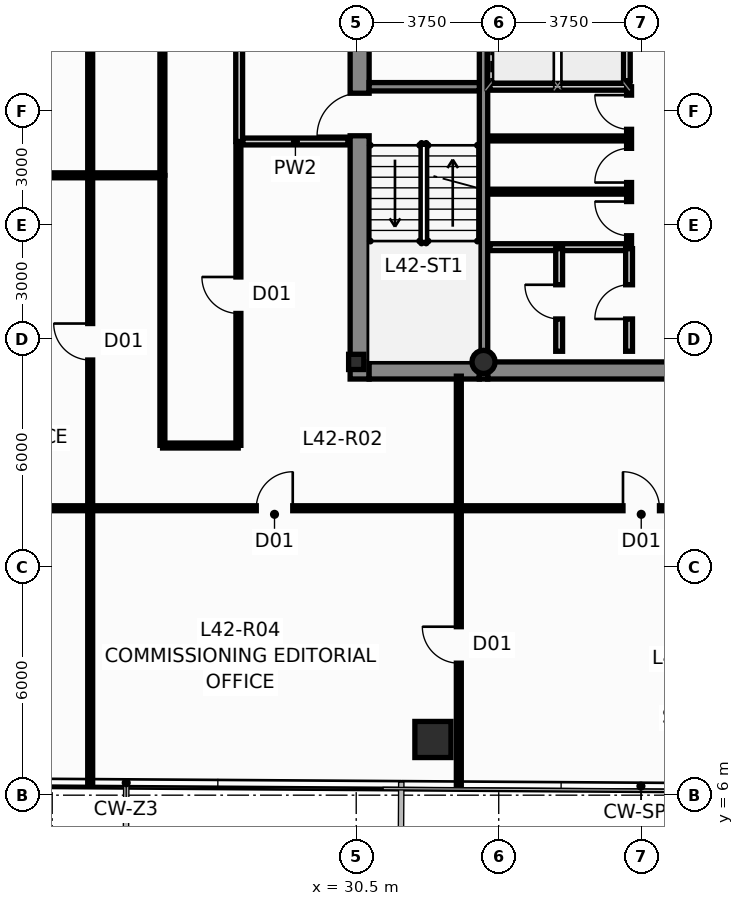
"""IFC4 building model, lengths in metres.
Left out: names, types, materials, properties, quantities, classifications, styles, units other than length and angle.
Written with IfcOpenShell. Run it as: python <this file> out.ifc"""

import sys

from ifc_helpers import new_model, si_unit, direction, frame, frame_2d, origin, origin_2d, place, context, subcontext, project, spatial, rectangle, hollow_rectangle, hollow_circle, i_section, extrude, source, transform, mapped, element, fill, save


model = new_model("IFC4")
c1 = context("Model", 3, precision=1e-05, world=origin(), true_north=direction((0.0, 1.0)))
c2 = subcontext(c1, "Body", "Model", "MODEL_VIEW")
j1 = project(units=[si_unit("LENGTHUNIT", "METRE"), si_unit("PLANEANGLEUNIT", "RADIAN")], contexts=[c1])
p1 = place(None, origin())
s1 = spatial("IfcSite", under=j1, at=p1, CompositionType="ELEMENT")
p2 = place(p1, origin())
s2 = spatial("IfcBuilding", under=s1, at=p2, CompositionType="ELEMENT")
p3 = place(p2, frame((0.0, 0.0, 162.15)))
s3 = spatial("IfcBuildingStorey", under=s2, at=p3, CompositionType="ELEMENT", Elevation=162.15)
m1 = source(origin(), c2, "Body", "SweptSolid", [
    extrude(i_section(OverallWidth=0.4, OverallDepth=0.4, WebThickness=0.02, FlangeThickness=0.032, at=origin_2d()), origin(), (0.0, 0.0, 1.0), 3.65),
])
p4 = place(p3, frame((30.5, 17.4, 0.0), z_axis=(0.0, 0.0, 1.0), x_axis=(1.0, 0.0, 0.0)))
e1 = element("IfcColumn", 1, at=p4, inside=s3, PredefinedType="COLUMN", context=c2, shape_type="MappedRepresentation", body=[
    mapped(m1, transform((0.0, 0.0, 0.0), scale=1.0)),
])
m2 = source(origin(), c2, "Body", "SweptSolid", [
    extrude(hollow_circle(Radius=0.305, WallThickness=0.025, at=origin_2d()), origin(), (0.0, 0.0, 1.0), 3.65),
])
p5 = place(p3, frame((33.85, 17.4, 0.0), z_axis=(0.0, 0.0, 1.0), x_axis=(1.0, 0.0, 0.0)))
e2 = element("IfcColumn", 2, at=p5, inside=s3, PredefinedType="COLUMN", context=c2, shape_type="MappedRepresentation", body=[
    mapped(m2, transform((0.0, 0.0, 0.0), scale=1.0)),
])
p6 = place(p3, frame((30.59, 16.95, 0.0), z_axis=(0.0, 0.0, 1.0), x_axis=(0.0, 1.0, 0.0)))
e3 = element("IfcWall", 3, at=p6, inside=s3, PredefinedType="SHEAR", context=c2, shape_type="SweptSolid", body=[
    extrude(rectangle(XDim=13.275, YDim=0.5, at=frame_2d((6.638, 0.0))), origin(), (0.0, 0.0, 1.0), 3.65),
])
p7 = place(p6, frame((6.4, 0.0, 0.0)))
e4 = element("IfcOpeningElement", 4, at=p7, cuts=e3, PredefinedType="OPENING", context=c2, shape_type="SweptSolid", body=[
    extrude(rectangle(XDim=1.12, YDim=2.15, at=frame_2d((0.56, 1.075))), frame((0.0, 0.262, 0.0), z_axis=(0.0, -1.0, 0.0), x_axis=(1.0, 0.0, 0.0)), (0.0, 0.0, 1.0), 0.524),
])
p8 = place(p6, frame((10.85, 0.0, 0.0)))
e5 = element("IfcOpeningElement", 5, at=p8, cuts=e3, PredefinedType="OPENING", context=c2, shape_type="SweptSolid", body=[
    extrude(rectangle(XDim=1.2, YDim=2.2, at=frame_2d((0.6, 1.1))), frame((0.0, 0.262, 0.0), z_axis=(0.0, -1.0, 0.0), x_axis=(1.0, 0.0, 0.0)), (0.0, 0.0, 1.0), 0.524),
])
p9 = place(p3, frame((30.84, 17.175, 0.0), z_axis=(0.0, 0.0, 1.0), x_axis=(1.0, 0.0, 0.0)))
e6 = element("IfcWall", 6, at=p9, inside=s3, PredefinedType="SHEAR", context=c2, shape_type="SweptSolid", body=[
    extrude(rectangle(XDim=2.9, YDim=0.45, at=frame_2d((1.45, 0.0))), origin(), (0.0, 0.0, 1.0), 3.65),
])
p10 = place(p3, frame((33.96, 17.175, 0.0), z_axis=(0.0, 0.0, 1.0), x_axis=(1.0, 0.0, 0.0)))
e7 = element("IfcWall", 7, at=p10, inside=s3, PredefinedType="SHEAR", context=c2, shape_type="SweptSolid", body=[
    extrude(rectangle(XDim=8.08, YDim=0.45, at=frame_2d((4.04, 0.0))), origin(), (0.0, 0.0, 1.0), 3.65),
])
p11 = place(p3, frame((33.85, 16.95, 0.0), z_axis=(0.0, 0.0, 1.0), x_axis=(0.0, 1.0, 0.0)))
e8 = element("IfcWall", 8, at=p11, inside=s3, PredefinedType="SHEAR", context=c2, shape_type="SweptSolid", body=[
    extrude(rectangle(XDim=13.275, YDim=0.22, at=frame_2d((6.638, 0.0))), origin(), (0.0, 0.0, 1.0), 3.65),
])
p12 = place(p3, frame((30.84, 24.64, 0.0), z_axis=(0.0, 0.0, 1.0), x_axis=(1.0, 0.0, 0.0)))
e9 = element("IfcWall", 9, at=p12, inside=s3, PredefinedType="SHEAR", context=c2, shape_type="SweptSolid", body=[
    extrude(rectangle(XDim=2.9, YDim=0.22, at=frame_2d((1.45, 0.0))), origin(), (0.0, 0.0, 1.0), 3.65),
])
m3 = source(origin(), c2, "Body", "SweptSolid", [
    extrude(hollow_rectangle(XDim=0.95, YDim=0.95, WallThickness=0.05, at=origin_2d()), origin(), (0.0, 0.0, 1.0), 3.651),
])
p13 = place(p3, frame((32.519, 7.465, 0.0), z_axis=(-0.004480382638, 0.019793929266, 0.999794042058), x_axis=(-0.975326687046, -0.220766513622, 0.0)))
e10 = element("IfcColumn", 10, at=p13, inside=s3, PredefinedType="COLUMN", context=c2, shape_type="MappedRepresentation", body=[
    mapped(m3, transform((0.0, 0.0, 0.0), scale=1.0)),
])
p14 = place(p3, frame((37.62, 24.8, 0.0), z_axis=(0.0, 0.0, 1.0), x_axis=(0.0, 1.0, 0.0)))
e11 = element("IfcWall", 11, at=p14, inside=s3, PredefinedType="PARTITIONING", context=c2, shape_type="SweptSolid", body=[
    extrude(rectangle(XDim=2.0, YDim=0.18, at=frame_2d((1.0, 0.0))), origin(), (0.0, 0.0, 1.0), 3.4),
])
p15 = place(p3, frame((34.02, 24.64, 0.0), z_axis=(0.0, 0.0, 1.0), x_axis=(1.0, 0.0, 0.0)))
e12 = element("IfcWall", 12, at=p15, inside=s3, PredefinedType="PARTITIONING", context=c2, shape_type="SweptSolid", body=[
    extrude(rectangle(XDim=3.68, YDim=0.18, at=frame_2d((1.84, 0.0))), origin(), (0.0, 0.0, 1.0), 3.4),
])
p16 = place(p3, frame((27.42, 23.2, 0.0), z_axis=(0.0, 0.0, 1.0), x_axis=(0.0, 1.0, 0.0)))
e13 = element("IfcWall", 13, at=p16, inside=s3, PredefinedType="PARTITIONING", context=c2, shape_type="SweptSolid", body=[
    extrude(rectangle(XDim=6.4, YDim=0.18, at=frame_2d((3.2, 0.0))), origin(), (0.0, 0.0, 1.0), 3.078),
])
p17 = place(p16, frame((2.65, 0.0, 0.0)))
e14 = element("IfcOpeningElement", 14, at=p17, cuts=e13, PredefinedType="OPENING", context=c2, shape_type="SweptSolid", body=[
    extrude(rectangle(XDim=1.05, YDim=2.15, at=frame_2d((0.525, 1.075))), frame((0.0, 0.102, 0.0), z_axis=(0.0, -1.0, 0.0), x_axis=(1.0, 0.0, 0.0)), (0.0, 0.0, 1.0), 0.204),
])
p18 = place(p3, frame((27.52, 23.2, 0.0), z_axis=(0.0, 0.0, 1.0), x_axis=(1.0, 0.0, 0.0)))
e15 = element("IfcWall", 15, at=p18, inside=s3, PredefinedType="PARTITIONING", context=c2, shape_type="SweptSolid", body=[
    extrude(rectangle(XDim=2.76, YDim=0.18, at=frame_2d((1.38, 0.0))), origin(), (0.0, 0.0, 1.0), 3.4),
])
p19 = place(p3, frame((34.02, 20.42, 0.0), z_axis=(0.0, 0.0, 1.0), x_axis=(1.0, 0.0, 0.0)))
e16 = element("IfcWall", 16, at=p19, inside=s3, PredefinedType="PARTITIONING", context=c2, shape_type="SweptSolid", body=[
    extrude(rectangle(XDim=3.64, YDim=0.18, at=frame_2d((1.82, 0.0))), origin(), (0.0, 0.0, 1.0), 3.4),
])
for number, where, z_axis, x_axis in (
    (17, (34.02, 21.88, 0.0), (0.0, 0.0, 1.0), (1.0, 0.0, 0.0)),
    (18, (34.02, 23.28, 0.0), (0.0, 0.0, 1.0), (1.0, 0.0, 0.0)),
):
    element("IfcWall", number, at=place(p3, frame(where, z_axis=z_axis, x_axis=x_axis)), inside=s3, PredefinedType="PARTITIONING", context=c2, shape_type="SweptSolid", body=[
        extrude(rectangle(XDim=3.58, YDim=0.13, at=frame_2d((1.79, 0.0))), origin(), (0.0, 0.0, 1.0), 3.4),
    ])
p20 = place(p3, frame((37.68, 20.5, 0.0), z_axis=(0.0, 0.0, 1.0), x_axis=(0.0, 1.0, 0.0)))
e19 = element("IfcWall", 19, at=p20, inside=s3, PredefinedType="PARTITIONING", context=c2, shape_type="SweptSolid", body=[
    extrude(rectangle(XDim=4.14, YDim=0.13, at=frame_2d((2.07, 0.0))), origin(), (0.0, 0.0, 1.0), 3.4),
])
p21 = place(p20, frame((0.22, 0.0, 0.0)))
e20 = element("IfcOpeningElement", 20, at=p21, cuts=e19, PredefinedType="OPENING", context=c2, shape_type="SweptSolid", body=[
    extrude(rectangle(XDim=0.9, YDim=2.1, at=frame_2d((0.45, 1.05))), frame((0.0, 0.077, 0.0), z_axis=(0.0, -1.0, 0.0), x_axis=(1.0, 0.0, 0.0)), (0.0, 0.0, 1.0), 0.154),
])
p22 = place(p20, frame((1.62, 0.0, 0.0)))
e21 = element("IfcOpeningElement", 21, at=p22, cuts=e19, PredefinedType="OPENING", context=c2, shape_type="SweptSolid", body=[
    extrude(rectangle(XDim=0.9, YDim=2.1, at=frame_2d((0.45, 1.05))), frame((0.0, 0.077, 0.0), z_axis=(0.0, -1.0, 0.0), x_axis=(1.0, 0.0, 0.0)), (0.0, 0.0, 1.0), 0.154),
])
p23 = place(p20, frame((3.02, 0.0, 0.0)))
e22 = element("IfcOpeningElement", 22, at=p23, cuts=e19, PredefinedType="OPENING", context=c2, shape_type="SweptSolid", body=[
    extrude(rectangle(XDim=0.9, YDim=2.1, at=frame_2d((0.45, 1.05))), frame((0.0, 0.077, 0.0), z_axis=(0.0, -1.0, 0.0), x_axis=(1.0, 0.0, 0.0)), (0.0, 0.0, 1.0), 0.154),
])
p24 = place(p3, frame((35.84, 17.68, 0.0), z_axis=(0.0, 0.0, 1.0), x_axis=(0.0, 1.0, 0.0)))
e23 = element("IfcWall", 23, at=p24, inside=s3, PredefinedType="PARTITIONING", context=c2, shape_type="SweptSolid", body=[
    extrude(rectangle(XDim=2.7, YDim=0.18, at=frame_2d((1.35, 0.0))), origin(), (0.0, 0.0, 1.0), 3.4),
])
p25 = place(p24, frame((0.85, 0.0, 0.0)))
e24 = element("IfcOpeningElement", 24, at=p25, cuts=e23, PredefinedType="OPENING", context=c2, shape_type="SweptSolid", body=[
    extrude(rectangle(XDim=0.9, YDim=2.1, at=frame_2d((0.45, 1.05))), frame((0.0, 0.102, 0.0), z_axis=(0.0, -1.0, 0.0), x_axis=(1.0, 0.0, 0.0)), (0.0, 0.0, 1.0), 0.204),
])
p26 = place(p3, frame((37.68, 17.68, 0.0), z_axis=(0.0, 0.0, 1.0), x_axis=(0.0, 1.0, 0.0)))
e25 = element("IfcWall", 25, at=p26, inside=s3, PredefinedType="PARTITIONING", context=c2, shape_type="SweptSolid", body=[
    extrude(rectangle(XDim=2.7, YDim=0.18, at=frame_2d((1.35, 0.0))), origin(), (0.0, 0.0, 1.0), 3.4),
])
p27 = place(p26, frame((0.85, 0.0, 0.0)))
e26 = element("IfcOpeningElement", 26, at=p27, cuts=e25, PredefinedType="OPENING", context=c2, shape_type="SweptSolid", body=[
    extrude(rectangle(XDim=0.9, YDim=2.1, at=frame_2d((0.45, 1.05))), frame((0.0, 0.102, 0.0), z_axis=(0.0, -1.0, 0.0), x_axis=(1.0, 0.0, 0.0)), (0.0, 0.0, 1.0), 0.204),
])
p28 = place(p3, frame((12.914, 13.55, 0.0), z_axis=(0.0, 0.0, 1.0), x_axis=(1.0, 0.0, 0.0)))
e27 = element("IfcWall", 27, at=p28, inside=s3, PredefinedType="PARTITIONING", context=c2, shape_type="SweptSolid", body=[
    extrude(rectangle(XDim=10.581, YDim=0.13, at=frame_2d((5.291, 0.0))), origin(), (0.0, 0.0, 1.0), 3.4),
])
p29 = place(p28, frame((4.863, 0.0, 0.0)))
e28 = element("IfcOpeningElement", 28, at=p29, cuts=e27, PredefinedType="OPENING", context=c2, shape_type="SweptSolid", body=[
    extrude(rectangle(XDim=0.96, YDim=2.15, at=frame_2d((0.48, 1.075))), frame((0.0, 0.077, 0.0), z_axis=(0.0, -1.0, 0.0), x_axis=(1.0, 0.0, 0.0)), (0.0, 0.0, 1.0), 0.154),
])
p30 = place(p3, frame((23.505, 13.55, 0.0), z_axis=(0.0, 0.0, 1.0), x_axis=(1.0, 0.0, 0.0)))
e29 = element("IfcWall", 29, at=p30, inside=s3, PredefinedType="PARTITIONING", context=c2, shape_type="SweptSolid", body=[
    extrude(rectangle(XDim=9.69, YDim=0.13, at=frame_2d((4.845, 0.0))), origin(), (0.0, 0.0, 1.0), 3.4),
])
p31 = place(p30, frame((4.365, 0.0, 0.0)))
e30 = element("IfcOpeningElement", 30, at=p31, cuts=e29, PredefinedType="OPENING", context=c2, shape_type="SweptSolid", body=[
    extrude(rectangle(XDim=0.96, YDim=2.15, at=frame_2d((0.48, 1.075))), frame((0.0, 0.077, 0.0), z_axis=(0.0, -1.0, 0.0), x_axis=(1.0, 0.0, 0.0)), (0.0, 0.0, 1.0), 0.154),
])
p32 = place(p3, frame((33.205, 13.55, 0.0), z_axis=(0.0, 0.0, 1.0), x_axis=(1.0, 0.0, 0.0)))
e31 = element("IfcWall", 31, at=p32, inside=s3, PredefinedType="PARTITIONING", context=c2, shape_type="SweptSolid", body=[
    extrude(rectangle(XDim=9.59, YDim=0.13, at=frame_2d((4.795, 0.0))), origin(), (0.0, 0.0, 1.0), 3.4),
])
p33 = place(p32, frame((4.315, 0.0, 0.0)))
e32 = element("IfcOpeningElement", 32, at=p33, cuts=e31, PredefinedType="OPENING", context=c2, shape_type="SweptSolid", body=[
    extrude(rectangle(XDim=0.96, YDim=2.15, at=frame_2d((0.48, 1.075))), frame((0.0, 0.077, 0.0), z_axis=(0.0, -1.0, 0.0), x_axis=(1.0, 0.0, 0.0)), (0.0, 0.0, 1.0), 0.154),
])
p34 = place(p3, frame((23.5, 13.555, 0.0), z_axis=(0.0, 0.0, 1.0), x_axis=(0.0, 1.0, 0.0)))
e33 = element("IfcWall", 33, at=p34, inside=s3, PredefinedType="PARTITIONING", context=c2, shape_type="SweptSolid", body=[
    extrude(rectangle(XDim=8.75, YDim=0.13, at=frame_2d((4.375, 0.0))), origin(), (0.0, 0.0, 1.0), 3.078),
])
p35 = place(p34, frame((3.895, 0.0, 0.0)))
e34 = element("IfcOpeningElement", 34, at=p35, cuts=e33, PredefinedType="OPENING", context=c2, shape_type="SweptSolid", body=[
    extrude(rectangle(XDim=0.96, YDim=2.15, at=frame_2d((0.48, 1.075))), frame((0.0, 0.077, 0.0), z_axis=(0.0, -1.0, 0.0), x_axis=(1.0, 0.0, 0.0)), (0.0, 0.0, 1.0), 0.154),
])
p36 = place(p3, frame((27.4, 15.205, 0.0), z_axis=(0.0, 0.0, 1.0), x_axis=(0.0, 1.0, 0.0)))
e35 = element("IfcWall", 35, at=p36, inside=s3, PredefinedType="PARTITIONING", context=c2, shape_type="SweptSolid", body=[
    extrude(rectangle(XDim=7.9, YDim=0.13, at=frame_2d((3.95, 0.0))), origin(), (0.0, 0.0, 1.0), 3.4),
])
p37 = place(p36, frame((3.47, 0.0, 0.0)))
e36 = element("IfcOpeningElement", 36, at=p37, cuts=e35, PredefinedType="OPENING", context=c2, shape_type="SweptSolid", body=[
    extrude(rectangle(XDim=0.96, YDim=2.15, at=frame_2d((0.48, 1.075))), frame((0.0, 0.077, 0.0), z_axis=(0.0, -1.0, 0.0), x_axis=(1.0, 0.0, 0.0)), (0.0, 0.0, 1.0), 0.154),
])
p38 = place(p3, frame((25.4, 30.095, 0.0), z_axis=(0.0, 0.0, 1.0), x_axis=(0.0, -1.0, 0.0)))
e37 = element("IfcWall", 37, at=p38, inside=s3, PredefinedType="PARTITIONING", context=c2, shape_type="SweptSolid", body=[
    extrude(rectangle(XDim=7.78, YDim=0.13, at=frame_2d((3.89, 0.0))), origin(), (0.0, 0.0, 1.0), 3.078),
])
p39 = place(p38, frame((3.41, 0.0, 0.0)))
e38 = element("IfcOpeningElement", 38, at=p39, cuts=e37, PredefinedType="OPENING", context=c2, shape_type="SweptSolid", body=[
    extrude(rectangle(XDim=0.96, YDim=2.15, at=frame_2d((0.48, 1.075))), frame((0.0, 0.077, 0.0), z_axis=(0.0, -1.0, 0.0), x_axis=(1.0, 0.0, 0.0)), (0.0, 0.0, 1.0), 0.154),
])
p40 = place(p3, frame((23.5, 22.315, 0.0), z_axis=(0.0, 0.0, 1.0), x_axis=(0.0, 1.0, 0.0)))
e39 = element("IfcWall", 39, at=p40, inside=s3, PredefinedType="PARTITIONING", context=c2, shape_type="SweptSolid", body=[
    extrude(rectangle(XDim=7.78, YDim=0.13, at=frame_2d((3.89, 0.0))), origin(), (0.0, 0.0, 1.0), 3.078),
])
p41 = place(p40, frame((3.41, 0.0, 0.0)))
e40 = element("IfcOpeningElement", 40, at=p41, cuts=e39, PredefinedType="OPENING", context=c2, shape_type="SweptSolid", body=[
    extrude(rectangle(XDim=0.96, YDim=2.15, at=frame_2d((0.48, 1.075))), frame((0.0, 0.077, 0.0), z_axis=(0.0, -1.0, 0.0), x_axis=(1.0, 0.0, 0.0)), (0.0, 0.0, 1.0), 0.154),
])
p42 = place(p3, frame((33.2, 6.265, 0.0), z_axis=(0.0, 0.0, 1.0), x_axis=(0.0, 1.0, 0.0)))
e41 = element("IfcWall", 41, at=p42, inside=s3, PredefinedType="PARTITIONING", context=c2, shape_type="SweptSolid", body=[
    extrude(rectangle(XDim=7.28, YDim=0.13, at=frame_2d((3.64, 0.0))), origin(), (0.0, 0.0, 1.0), 3.4),
])
p43 = place(p42, frame((3.208, 0.0, 0.0)))
e42 = element("IfcOpeningElement", 42, at=p43, cuts=e41, PredefinedType="OPENING", context=c2, shape_type="SweptSolid", body=[
    extrude(rectangle(XDim=0.96, YDim=2.15, at=frame_2d((0.48, 1.075))), frame((0.0, 0.077, 0.0), z_axis=(0.0, -1.0, 0.0), x_axis=(1.0, 0.0, 0.0)), (0.0, 0.0, 1.0), 0.154),
])
p44 = place(p3, frame((23.5, 6.328, 0.0), z_axis=(0.0, 0.0, 1.0), x_axis=(0.0, 1.0, 0.0)))
e43 = element("IfcWall", 43, at=p44, inside=s3, PredefinedType="PARTITIONING", context=c2, shape_type="SweptSolid", body=[
    extrude(rectangle(XDim=7.217, YDim=0.13, at=frame_2d((3.608, 0.0))), origin(), (0.0, 0.0, 1.0), 3.4),
])
p45 = place(p3, frame((25.4, 22.305, 0.0), z_axis=(0.0, 0.0, 1.0), x_axis=(0.0, -1.0, 0.0)))
e44 = element("IfcWall", 44, at=p45, inside=s3, PredefinedType="PARTITIONING", context=c2, shape_type="SweptSolid", body=[
    extrude(rectangle(XDim=7.1, YDim=0.13, at=frame_2d((3.55, 0.0))), origin(), (0.0, 0.0, 1.0), 3.078),
])
p46 = place(p3, frame((16.939, 22.31, 0.0), z_axis=(0.0, 0.0, 1.0), x_axis=(1.0, 0.0, 0.0)))
e45 = element("IfcWall", 45, at=p46, inside=s3, PredefinedType="PARTITIONING", context=c2, shape_type="SweptSolid", body=[
    extrude(rectangle(XDim=6.556, YDim=0.13, at=frame_2d((3.278, 0.0))), origin(), (0.0, 0.0, 1.0), 3.4),
])
p47 = place(p3, frame((33.2, 13.555, 0.0), z_axis=(0.0, 0.0, 1.0), x_axis=(0.0, 1.0, 0.0)))
e46 = element("IfcWall", 46, at=p47, inside=s3, PredefinedType="PARTITIONING", context=c2, shape_type="SweptSolid", body=[
    extrude(rectangle(XDim=3.47, YDim=0.13, at=frame_2d((1.735, 0.0))), origin(), (0.0, 0.0, 1.0), 3.4),
])
p48 = place(p3, frame((25.405, 15.2, 0.0), z_axis=(0.0, 0.0, 1.0), x_axis=(1.0, 0.0, 0.0)))
e47 = element("IfcWall", 47, at=p48, inside=s3, PredefinedType="PARTITIONING", context=c2, shape_type="SweptSolid", body=[
    extrude(rectangle(XDim=1.99, YDim=0.13, at=frame_2d((0.995, 0.0))), origin(), (0.0, 0.0, 1.0), 3.4),
])
p49 = place(p3, frame((23.505, 22.31, 0.0), z_axis=(0.0, 0.0, 1.0), x_axis=(1.0, 0.0, 0.0)))
e48 = element("IfcWall", 48, at=p49, inside=s3, PredefinedType="PARTITIONING", context=c2, shape_type="SweptSolid", body=[
    extrude(rectangle(XDim=1.89, YDim=0.13, at=frame_2d((0.945, 0.0))), origin(), (0.0, 0.0, 1.0), 3.4),
])
p50 = place(p7, origin())
e49 = element("IfcDoor", 49, at=p50, inside=s3, OperationType="SINGLE_SWING_LEFT", PredefinedType="DOOR", context=c2, shape_type="SweptSolid", body=[
    extrude(rectangle(XDim=1.12, YDim=2.15, at=frame_2d((0.56, 1.075))), frame((0.0, 0.025, 0.0), z_axis=(0.0, -1.0, 0.0), x_axis=(1.0, 0.0, 0.0)), (0.0, 0.0, 1.0), 0.05),
])
fill(e4, e49)
p51 = place(p21, origin())
e50 = element("IfcDoor", 50, at=p51, inside=s3, OperationType="SINGLE_SWING_RIGHT", PredefinedType="DOOR", context=c2, shape_type="SweptSolid", body=[
    extrude(rectangle(XDim=0.9, YDim=2.1, at=frame_2d((0.45, 1.05))), frame((0.0, 0.025, 0.0), z_axis=(0.0, -1.0, 0.0), x_axis=(1.0, 0.0, 0.0)), (0.0, 0.0, 1.0), 0.05),
])
fill(e20, e50)
p52 = place(p22, origin())
e51 = element("IfcDoor", 51, at=p52, inside=s3, OperationType="SINGLE_SWING_LEFT", PredefinedType="DOOR", context=c2, shape_type="SweptSolid", body=[
    extrude(rectangle(XDim=0.9, YDim=2.1, at=frame_2d((0.45, 1.05))), frame((0.0, 0.025, 0.0), z_axis=(0.0, -1.0, 0.0), x_axis=(1.0, 0.0, 0.0)), (0.0, 0.0, 1.0), 0.05),
])
fill(e21, e51)
p53 = place(p23, origin())
e52 = element("IfcDoor", 52, at=p53, inside=s3, OperationType="SINGLE_SWING_RIGHT", PredefinedType="DOOR", context=c2, shape_type="SweptSolid", body=[
    extrude(rectangle(XDim=0.9, YDim=2.1, at=frame_2d((0.45, 1.05))), frame((0.0, 0.025, 0.0), z_axis=(0.0, -1.0, 0.0), x_axis=(1.0, 0.0, 0.0)), (0.0, 0.0, 1.0), 0.05),
])
fill(e22, e52)
p54 = place(p25, origin())
e53 = element("IfcDoor", 53, at=p54, inside=s3, OperationType="SINGLE_SWING_RIGHT", PredefinedType="DOOR", context=c2, shape_type="SweptSolid", body=[
    extrude(rectangle(XDim=0.9, YDim=2.1, at=frame_2d((0.45, 1.05))), frame((0.0, 0.025, 0.0), z_axis=(0.0, -1.0, 0.0), x_axis=(1.0, 0.0, 0.0)), (0.0, 0.0, 1.0), 0.05),
])
fill(e24, e53)
p55 = place(p27, origin())
e54 = element("IfcDoor", 54, at=p55, inside=s3, OperationType="SINGLE_SWING_LEFT", PredefinedType="DOOR", context=c2, shape_type="SweptSolid", body=[
    extrude(rectangle(XDim=0.9, YDim=2.1, at=frame_2d((0.45, 1.05))), frame((0.0, 0.025, 0.0), z_axis=(0.0, -1.0, 0.0), x_axis=(1.0, 0.0, 0.0)), (0.0, 0.0, 1.0), 0.05),
])
fill(e26, e54)
p56 = place(p31, origin())
e55 = element("IfcDoor", 55, at=p56, inside=s3, OperationType="SINGLE_SWING_RIGHT", PredefinedType="DOOR", context=c2, shape_type="SweptSolid", body=[
    extrude(rectangle(XDim=0.96, YDim=2.15, at=frame_2d((0.48, 1.075))), frame((0.0, 0.025, 0.0), z_axis=(0.0, -1.0, 0.0), x_axis=(1.0, 0.0, 0.0)), (0.0, 0.0, 1.0), 0.05),
])
fill(e30, e55)
p57 = place(p33, origin())
e56 = element("IfcDoor", 56, at=p57, inside=s3, OperationType="SINGLE_SWING_LEFT", PredefinedType="DOOR", context=c2, shape_type="SweptSolid", body=[
    extrude(rectangle(XDim=0.96, YDim=2.15, at=frame_2d((0.48, 1.075))), frame((0.0, 0.025, 0.0), z_axis=(0.0, -1.0, 0.0), x_axis=(1.0, 0.0, 0.0)), (0.0, 0.0, 1.0), 0.05),
])
fill(e32, e56)
p58 = place(p35, origin())
e57 = element("IfcDoor", 57, at=p58, inside=s3, OperationType="SINGLE_SWING_RIGHT", PredefinedType="DOOR", context=c2, shape_type="SweptSolid", body=[
    extrude(rectangle(XDim=0.96, YDim=2.15, at=frame_2d((0.48, 1.075))), frame((0.0, 0.025, 0.0), z_axis=(0.0, -1.0, 0.0), x_axis=(1.0, 0.0, 0.0)), (0.0, 0.0, 1.0), 0.05),
])
fill(e34, e57)
p59 = place(p37, origin())
e58 = element("IfcDoor", 58, at=p59, inside=s3, OperationType="SINGLE_SWING_RIGHT", PredefinedType="DOOR", context=c2, shape_type="SweptSolid", body=[
    extrude(rectangle(XDim=0.96, YDim=2.15, at=frame_2d((0.48, 1.075))), frame((0.0, 0.025, 0.0), z_axis=(0.0, -1.0, 0.0), x_axis=(1.0, 0.0, 0.0)), (0.0, 0.0, 1.0), 0.05),
])
fill(e36, e58)
p60 = place(p43, origin())
e59 = element("IfcDoor", 59, at=p60, inside=s3, OperationType="SINGLE_SWING_RIGHT", PredefinedType="DOOR", context=c2, shape_type="SweptSolid", body=[
    extrude(rectangle(XDim=0.96, YDim=2.15, at=frame_2d((0.48, 1.075))), frame((0.0, 0.025, 0.0), z_axis=(0.0, -1.0, 0.0), x_axis=(1.0, 0.0, 0.0)), (0.0, 0.0, 1.0), 0.05),
])
fill(e42, e59)
save(model, sys.argv[1])
